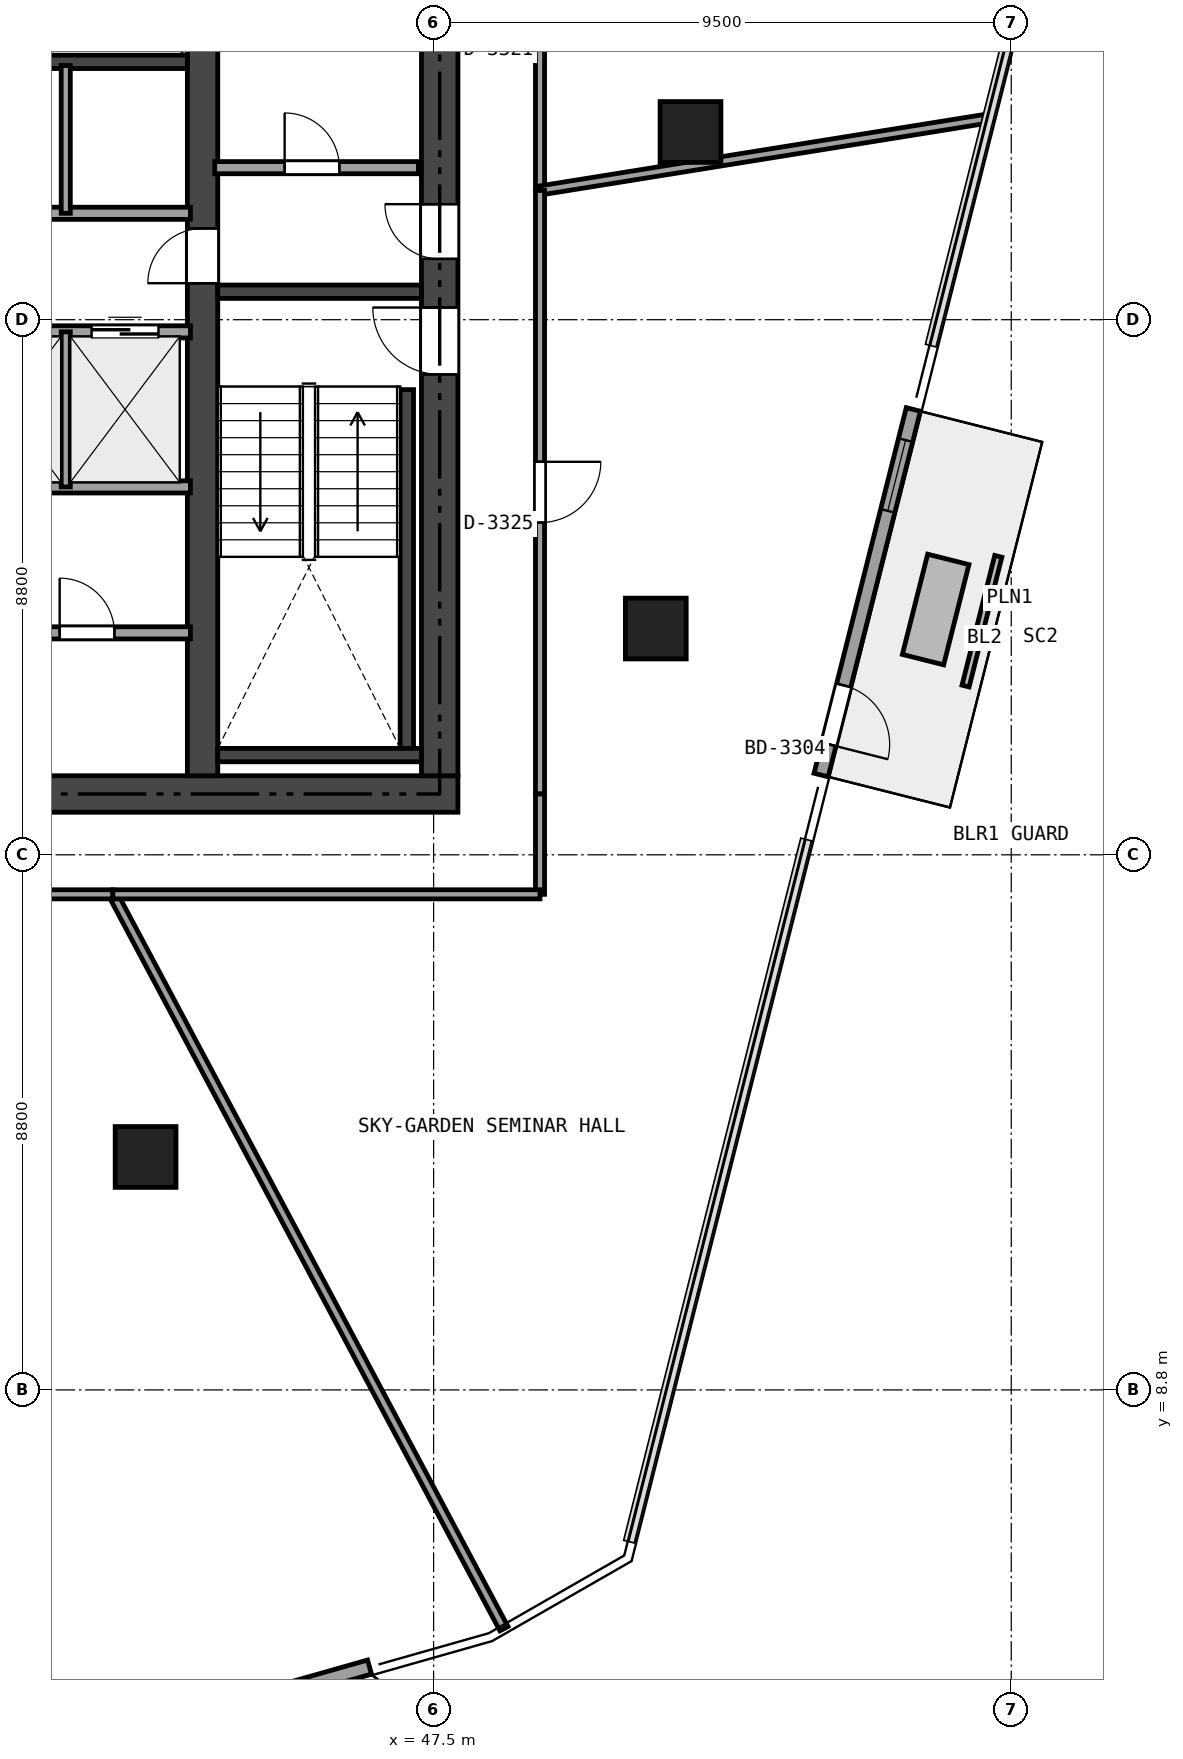
"""IFC4 building model, lengths in metres.
Left out: names, types, materials, properties, quantities, classifications, styles, units other than length and angle.
Written with IfcOpenShell. Run it as: python <this file> out.ifc"""

import sys

from ifc_helpers import new_model, si_unit, direction, frame, frame_2d, origin, origin_2d, place, context, subcontext, project, spatial, rectangle, extrude, element, fill, save


model = new_model("IFC4")
c1 = context("Model", 3, precision=1e-05, world=origin(), true_north=direction((0.0, 1.0)))
c2 = subcontext(c1, "Body", "Model", "MODEL_VIEW")
j1 = project(units=[si_unit("LENGTHUNIT", "METRE"), si_unit("PLANEANGLEUNIT", "RADIAN")], contexts=[c1])
p1 = place(None, origin())
s1 = spatial("IfcSite", under=j1, at=p1, CompositionType="ELEMENT")
p2 = place(p1, origin())
s2 = spatial("IfcBuilding", under=s1, at=p2, CompositionType="ELEMENT")
p3 = place(p2, frame((0.0, 0.0, 125.7)))
s3 = spatial("IfcBuildingStorey", under=s2, at=p3, CompositionType="ELEMENT", Elevation=125.7)
p4 = place(p3, frame((26.5, 18.6, 0.0), z_axis=(0.0, 0.0, 1.0), x_axis=(1.0, 0.0, 0.0)))
e1 = element("IfcWall", 1, at=p4, inside=s3, PredefinedType="SHEAR", context=c2, shape_type="SweptSolid", body=[
    extrude(rectangle(XDim=21.4, YDim=0.6, at=frame_2d((10.7, 0.0))), origin(), (0.0, 0.0, 1.0), 3.32),
])
p5 = place(p4, frame((12.425, 0.0, 0.0)))
e2 = element("IfcOpeningElement", 2, at=p5, cuts=e1, PredefinedType="OPENING", context=c2, shape_type="SweptSolid", body=[
    extrude(rectangle(XDim=1.15, YDim=2.15, at=frame_2d((0.575, 1.075))), frame((0.0, 0.31, 0.0), z_axis=(0.0, -1.0, 0.0), x_axis=(1.0, 0.0, 0.0)), (0.0, 0.0, 1.0), 0.62),
])
p6 = place(p4, frame((5.25, 0.0, 0.0)))
e3 = element("IfcOpeningElement", 3, at=p6, cuts=e1, PredefinedType="OPENING", context=c2, shape_type="SweptSolid", body=[
    extrude(rectangle(XDim=0.9, YDim=2.1, at=frame_2d((0.45, 1.05))), frame((0.0, 0.31, 0.0), z_axis=(0.0, -1.0, 0.0), x_axis=(1.0, 0.0, 0.0)), (0.0, 0.0, 1.0), 0.62),
])
p7 = place(p3, frame((47.6, 18.9, 0.0), z_axis=(0.0, 0.0, 1.0), x_axis=(0.0, 1.0, 0.0)))
e4 = element("IfcWall", 4, at=p7, inside=s3, PredefinedType="SHEAR", context=c2, shape_type="SweptSolid", body=[
    extrude(rectangle(XDim=15.0, YDim=0.6, at=frame_2d((7.5, 0.0))), origin(), (0.0, 0.0, 1.0), 3.32),
])
p8 = place(p7, frame((6.6, 0.0, 0.0)))
e5 = element("IfcOpeningElement", 5, at=p8, cuts=e4, PredefinedType="OPENING", context=c2, shape_type="SweptSolid", body=[
    extrude(rectangle(XDim=1.1, YDim=2.15, at=frame_2d((0.55, 1.075))), frame((0.0, 0.31, 0.0), z_axis=(0.0, -1.0, 0.0), x_axis=(1.0, 0.0, 0.0)), (0.0, 0.0, 1.0), 0.62),
])
p9 = place(p7, frame((8.5, 0.0, 0.0)))
e6 = element("IfcOpeningElement", 6, at=p9, cuts=e4, PredefinedType="OPENING", context=c2, shape_type="SweptSolid", body=[
    extrude(rectangle(XDim=0.9, YDim=2.1, at=frame_2d((0.45, 1.05))), frame((0.0, 0.31, 0.0), z_axis=(0.0, -1.0, 0.0), x_axis=(1.0, 0.0, 0.0)), (0.0, 0.0, 1.0), 0.62),
])
p10 = place(p7, frame((13.15, 0.0, 0.0)))
e7 = element("IfcOpeningElement", 7, at=p10, cuts=e4, PredefinedType="OPENING", context=c2, shape_type="SweptSolid", body=[
    extrude(rectangle(XDim=0.9, YDim=2.1, at=frame_2d((0.45, 1.05))), frame((0.0, 0.31, 0.0), z_axis=(0.0, -1.0, 0.0), x_axis=(1.0, 0.0, 0.0)), (0.0, 0.0, 1.0), 0.62),
])
p11 = place(p3, frame((43.7, 18.9, 0.0), z_axis=(0.0, 0.0, 1.0), x_axis=(0.0, 1.0, 0.0)))
e8 = element("IfcWall", 8, at=p11, inside=s3, PredefinedType="SHEAR", context=c2, shape_type="SweptSolid", body=[
    extrude(rectangle(XDim=15.0, YDim=0.5, at=frame_2d((7.5, 0.0))), origin(), (0.0, 0.0, 1.0), 3.32),
])
p12 = place(p11, frame((8.1, 0.0, 0.0)))
e9 = element("IfcOpeningElement", 9, at=p12, cuts=e8, PredefinedType="OPENING", context=c2, shape_type="SweptSolid", body=[
    extrude(rectangle(XDim=0.9, YDim=2.1, at=frame_2d((0.45, 1.05))), frame((0.0, 0.26, 0.0), z_axis=(0.0, -1.0, 0.0), x_axis=(1.0, 0.0, 0.0)), (0.0, 0.0, 1.0), 0.52),
])
p13 = place(p3, frame((43.95, 26.86, 0.0), z_axis=(0.0, 0.0, 1.0), x_axis=(1.0, 0.0, 0.0)))
e10 = element("IfcWall", 10, at=p13, inside=s3, PredefinedType="SHEAR", context=c2, shape_type="SweptSolid", body=[
    extrude(rectangle(XDim=3.35, YDim=0.22, at=frame_2d((1.675, 0.0))), origin(), (0.0, 0.0, 1.0), 3.32),
])
p14 = place(p3, frame((47.06, 19.35, 0.0), z_axis=(0.0, 0.0, 1.0), x_axis=(0.0, 1.0, 0.0)))
e11 = element("IfcWall", 11, at=p14, inside=s3, PredefinedType="SHEAR", context=c2, shape_type="SweptSolid", body=[
    extrude(rectangle(XDim=5.9, YDim=0.22, at=frame_2d((2.95, 0.0))), origin(), (0.0, 0.0, 1.0), 3.32),
])
p15 = place(p3, frame((43.95, 19.24, 0.0), z_axis=(0.0, 0.0, 1.0), x_axis=(1.0, 0.0, 0.0)))
e12 = element("IfcWall", 12, at=p15, inside=s3, PredefinedType="SHEAR", context=c2, shape_type="SweptSolid", body=[
    extrude(rectangle(XDim=3.35, YDim=0.22, at=frame_2d((1.675, 0.0))), origin(), (0.0, 0.0, 1.0), 3.32),
])
p16 = place(p3, frame((35.84, 30.64, 0.0), z_axis=(0.0, 0.0, 1.0), x_axis=(1.0, 0.0, 0.0)))
e13 = element("IfcWall", 13, at=p16, inside=s3, PredefinedType="SHEAR", context=c2, shape_type="SweptSolid", body=[
    extrude(rectangle(XDim=7.61, YDim=0.22, at=frame_2d((3.805, 0.0))), origin(), (0.0, 0.0, 1.0), 3.32),
])
for number, where, z_axis, x_axis in (
    (14, (51.725, 29.487, -0.405), (0.0, 0.0, 1.0), (1.0, 0.0, 0.0)),
    (15, (42.763, 12.631, -0.405), (0.0, 0.0, 1.0), (1.0, 0.0, 0.0)),
    (16, (51.154, 21.321, -0.405), (0.0, 0.0, 1.0), (1.0, 0.0, 0.0)),
):
    element("IfcColumn", number, at=place(p3, frame(where, z_axis=z_axis, x_axis=x_axis)), inside=s3, PredefinedType="COLUMN", context=c2, shape_type="SweptSolid", body=[
        extrude(rectangle(XDim=1.0, YDim=1.0, at=origin_2d()), origin(), (0.0, 0.0, 1.0), 3.725),
    ])
p17 = place(p3, frame((46.446, 4.242, 0.0), z_axis=(0.0, 0.0, 1.0), x_axis=(-0.962062892843, -0.272827766577, 0.0)))
e17 = element("IfcWall", 17, at=p17, inside=s3, PredefinedType="SOLIDWALL", context=c2, shape_type="SweptSolid", body=[
    extrude(rectangle(XDim=4.6, YDim=0.24, at=frame_2d((2.3, 0.0))), origin(), (0.0, 0.0, 1.0), 3.32),
])
p18 = place(p17, frame((3.08, 0.0, 0.0)))
e18 = element("IfcOpeningElement", 18, at=p18, cuts=e17, PredefinedType="OPENING", context=c2, shape_type="SweptSolid", body=[
    extrude(rectangle(XDim=1.0, YDim=2.15, at=frame_2d((0.5, 1.075))), frame((0.0, 0.13, 0.0), z_axis=(0.0, -1.0, 0.0), x_axis=(1.0, 0.0, 0.0)), (0.0, 0.0, 1.0), 0.26),
])
p19 = place(p3, frame((55.39, 24.924, 0.0), z_axis=(0.0, 0.0, 1.0), x_axis=(-0.244638154376, -0.969614445759, 0.0)))
e19 = element("IfcWall", 19, at=p19, inside=s3, PredefinedType="SOLIDWALL", context=c2, shape_type="SweptSolid", body=[
    extrude(rectangle(XDim=6.2, YDim=0.24, at=frame_2d((3.1, 0.0))), origin(), (0.0, 0.0, 1.0), 3.32),
])
p20 = place(p19, frame((4.68, 0.0, 0.0)))
e20 = element("IfcOpeningElement", 20, at=p20, cuts=e19, PredefinedType="OPENING", context=c2, shape_type="SweptSolid", body=[
    extrude(rectangle(XDim=1.0, YDim=2.15, at=frame_2d((0.5, 1.075))), frame((0.0, 0.13, 0.0), z_axis=(0.0, -1.0, 0.0), x_axis=(1.0, 0.0, 0.0)), (0.0, 0.0, 1.0), 0.26),
])
p21 = place(p19, frame((0.52, 0.0, 0.2)))
e21 = element("IfcOpeningElement", 21, at=p21, cuts=e19, PredefinedType="OPENING", context=c2, shape_type="SweptSolid", body=[
    extrude(rectangle(XDim=1.2, YDim=1.8, at=frame_2d((0.6, 0.9))), frame((0.0, 0.13, 0.0), z_axis=(0.0, -1.0, 0.0), x_axis=(1.0, 0.0, 0.0)), (0.0, 0.0, 1.0), 0.26),
])
p22 = place(p3, frame((43.9, 28.9, 0.0), z_axis=(0.0, 0.0, 1.0), x_axis=(1.0, 0.0, 0.0)))
e22 = element("IfcWall", 22, at=p22, inside=s3, PredefinedType="SOLIDWALL", context=c2, shape_type="SweptSolid", body=[
    extrude(rectangle(XDim=3.35, YDim=0.2, at=frame_2d((1.675, 0.0))), origin(), (0.0, 0.0, 1.0), 3.32),
])
p23 = place(p22, frame((1.15, 0.0, 0.0)))
e23 = element("IfcOpeningElement", 23, at=p23, cuts=e22, PredefinedType="OPENING", context=c2, shape_type="SweptSolid", body=[
    extrude(rectangle(XDim=0.9, YDim=2.1, at=frame_2d((0.45, 1.05))), frame((0.0, 0.11, 0.0), z_axis=(0.0, -1.0, 0.0), x_axis=(1.0, 0.0, 0.0)), (0.0, 0.0, 1.0), 0.22),
])
p24 = place(p3, frame((35.62, 28.15, 0.0), z_axis=(0.0, 0.0, 1.0), x_axis=(1.0, 0.0, 0.0)))
e24 = element("IfcWall", 24, at=p24, inside=s3, PredefinedType="SOLIDWALL", context=c2, shape_type="SweptSolid", body=[
    extrude(rectangle(XDim=7.88, YDim=0.2, at=frame_2d((3.94, 0.0))), origin(), (0.0, 0.0, 1.0), 3.32),
])
p25 = place(p3, frame((35.62, 26.2, 0.0), z_axis=(0.0, 0.0, 1.0), x_axis=(1.0, 0.0, 0.0)))
e25 = element("IfcWall", 25, at=p25, inside=s3, PredefinedType="SOLIDWALL", context=c2, shape_type="SweptSolid", body=[
    extrude(rectangle(XDim=7.88, YDim=0.2, at=frame_2d((3.94, 0.0))), origin(), (0.0, 0.0, 1.0), 3.32),
])
p26 = place(p25, frame((0.405, 0.0, 0.0)))
e26 = element("IfcOpeningElement", 26, at=p26, cuts=e25, PredefinedType="OPENING", context=c2, shape_type="SweptSolid", body=[
    extrude(rectangle(XDim=1.1, YDim=2.15, at=frame_2d((0.55, 1.075))), frame((0.0, 0.11, 0.0), z_axis=(0.0, -1.0, 0.0), x_axis=(1.0, 0.0, 0.0)), (0.0, 0.0, 1.0), 0.22),
])
p27 = place(p25, frame((2.355, 0.0, 0.0)))
e27 = element("IfcOpeningElement", 27, at=p27, cuts=e25, PredefinedType="OPENING", context=c2, shape_type="SweptSolid", body=[
    extrude(rectangle(XDim=1.1, YDim=2.15, at=frame_2d((0.55, 1.075))), frame((0.0, 0.11, 0.0), z_axis=(0.0, -1.0, 0.0), x_axis=(1.0, 0.0, 0.0)), (0.0, 0.0, 1.0), 0.22),
])
p28 = place(p25, frame((4.305, 0.0, 0.0)))
e28 = element("IfcOpeningElement", 28, at=p28, cuts=e25, PredefinedType="OPENING", context=c2, shape_type="SweptSolid", body=[
    extrude(rectangle(XDim=1.1, YDim=2.15, at=frame_2d((0.55, 1.075))), frame((0.0, 0.11, 0.0), z_axis=(0.0, -1.0, 0.0), x_axis=(1.0, 0.0, 0.0)), (0.0, 0.0, 1.0), 0.22),
])
p29 = place(p25, frame((6.255, 0.0, 0.0)))
e29 = element("IfcOpeningElement", 29, at=p29, cuts=e25, PredefinedType="OPENING", context=c2, shape_type="SweptSolid", body=[
    extrude(rectangle(XDim=1.1, YDim=2.15, at=frame_2d((0.55, 1.075))), frame((0.0, 0.11, 0.0), z_axis=(0.0, -1.0, 0.0), x_axis=(1.0, 0.0, 0.0)), (0.0, 0.0, 1.0), 0.22),
])
p30 = place(p3, frame((35.62, 23.65, 0.0), z_axis=(0.0, 0.0, 1.0), x_axis=(1.0, 0.0, 0.0)))
e30 = element("IfcWall", 30, at=p30, inside=s3, PredefinedType="SOLIDWALL", context=c2, shape_type="SweptSolid", body=[
    extrude(rectangle(XDim=7.88, YDim=0.2, at=frame_2d((3.94, 0.0))), origin(), (0.0, 0.0, 1.0), 2.841),
])
p31 = place(p3, frame((35.62, 21.25, 0.0), z_axis=(0.0, 0.0, 1.0), x_axis=(1.0, 0.0, 0.0)))
e31 = element("IfcWall", 31, at=p31, inside=s3, PredefinedType="SOLIDWALL", context=c2, shape_type="SweptSolid", body=[
    extrude(rectangle(XDim=7.88, YDim=0.2, at=frame_2d((3.94, 0.0))), origin(), (0.0, 0.0, 1.0), 3.32),
])
p32 = place(p31, frame((1.13, 0.0, 0.0)))
e32 = element("IfcOpeningElement", 32, at=p32, cuts=e31, PredefinedType="OPENING", context=c2, shape_type="SweptSolid", body=[
    extrude(rectangle(XDim=0.9, YDim=2.1, at=frame_2d((0.45, 1.05))), frame((0.0, 0.11, 0.0), z_axis=(0.0, -1.0, 0.0), x_axis=(1.0, 0.0, 0.0)), (0.0, 0.0, 1.0), 0.22),
])
p33 = place(p31, frame((5.73, 0.0, 0.0)))
e33 = element("IfcOpeningElement", 33, at=p33, cuts=e31, PredefinedType="OPENING", context=c2, shape_type="SweptSolid", body=[
    extrude(rectangle(XDim=0.9, YDim=2.1, at=frame_2d((0.45, 1.05))), frame((0.0, 0.11, 0.0), z_axis=(0.0, -1.0, 0.0), x_axis=(1.0, 0.0, 0.0)), (0.0, 0.0, 1.0), 0.22),
])
p34 = place(p3, frame((41.45, 28.15, 0.0), z_axis=(0.0, 0.0, 1.0), x_axis=(0.0, 1.0, 0.0)))
e34 = element("IfcWall", 34, at=p34, inside=s3, PredefinedType="PARTITIONING", context=c2, shape_type="SweptSolid", body=[
    extrude(rectangle(XDim=2.43, YDim=0.15, at=frame_2d((1.215, 0.0))), origin(), (0.0, 0.0, 1.0), 3.32),
])
p35 = place(p3, frame((41.45, 23.65, 0.0), z_axis=(0.0, 0.0, 1.0), x_axis=(0.0, 1.0, 0.0)))
e35 = element("IfcWall", 35, at=p35, inside=s3, PredefinedType="PARTITIONING", context=c2, shape_type="SweptSolid", body=[
    extrude(rectangle(XDim=2.55, YDim=0.15, at=frame_2d((1.275, 0.0))), origin(), (0.0, 0.0, 1.0), 2.841),
])
p36 = place(p3, frame((49.25, 34.2, 0.0), z_axis=(0.0, 0.0, 1.0), x_axis=(0.0, -1.0, 0.0)))
e36 = element("IfcWall", 36, at=p36, inside=s3, PredefinedType="PARTITIONING", context=c2, shape_type="SweptSolid", body=[
    extrude(rectangle(XDim=5.675, YDim=0.15, at=frame_2d((2.837, 0.0))), origin(), (0.0, 0.0, 1.0), 2.687),
])
p37 = place(p36, frame((2.338, 0.0, 0.0)))
e37 = element("IfcOpeningElement", 37, at=p37, cuts=e36, PredefinedType="OPENING", context=c2, shape_type="SweptSolid", body=[
    extrude(rectangle(XDim=1.0, YDim=2.15, at=frame_2d((0.5, 1.075))), frame((0.0, 0.085, 0.0), z_axis=(0.0, -1.0, 0.0), x_axis=(1.0, 0.0, 0.0)), (0.0, 0.0, 1.0), 0.17),
])
p38 = place(p3, frame((49.25, 28.525, 0.0), z_axis=(0.0, 0.0, 1.0), x_axis=(0.987331098542, 0.158673570109, 0.0)))
e38 = element("IfcWall", 38, at=p38, inside=s3, PredefinedType="PARTITIONING", context=c2, shape_type="SweptSolid", body=[
    extrude(rectangle(XDim=7.513, YDim=0.15, at=frame_2d((3.757, 0.0))), origin(), (0.0, 0.0, 1.0), 2.805),
])
p39 = place(p3, frame((48.657, 4.873, 0.0), z_axis=(0.0, 0.0, 1.0), x_axis=(-0.470068613312, 0.882629876437, 0.0)))
e39 = element("IfcWall", 39, at=p39, inside=s3, PredefinedType="PARTITIONING", context=c2, shape_type="SweptSolid", body=[
    extrude(rectangle(XDim=13.683, YDim=0.15, at=frame_2d((6.841, 0.0))), origin(), (0.0, 0.0, 1.0), 2.805),
])
p40 = place(p3, frame((42.225, 16.95, 0.0), z_axis=(0.0, 0.0, 1.0), x_axis=(-1.0, 0.0, 0.0)))
e40 = element("IfcWall", 40, at=p40, inside=s3, PredefinedType="PARTITIONING", context=c2, shape_type="SweptSolid", body=[
    extrude(rectangle(XDim=14.151, YDim=0.15, at=frame_2d((7.076, 0.0))), origin(), (0.0, 0.0, 1.0), 2.687),
])
p41 = place(p40, frame((6.576, 0.0, 0.0)))
e41 = element("IfcOpeningElement", 41, at=p41, cuts=e40, PredefinedType="OPENING", context=c2, shape_type="SweptSolid", body=[
    extrude(rectangle(XDim=1.0, YDim=2.15, at=frame_2d((0.5, 1.075))), frame((0.0, 0.085, 0.0), z_axis=(0.0, -1.0, 0.0), x_axis=(1.0, 0.0, 0.0)), (0.0, 0.0, 1.0), 0.17),
])
p42 = place(p3, frame((49.25, 28.525, 0.0), z_axis=(0.0, 0.0, 1.0), x_axis=(0.0, -1.0, 0.0)))
e42 = element("IfcWall", 42, at=p42, inside=s3, PredefinedType="PARTITIONING", context=c2, shape_type="SweptSolid", body=[
    extrude(rectangle(XDim=9.925, YDim=0.15, at=frame_2d((4.962, 0.0))), origin(), (0.0, 0.0, 1.0), 2.687),
])
p43 = place(p42, frame((4.462, 0.0, 0.0)))
e43 = element("IfcOpeningElement", 43, at=p43, cuts=e42, PredefinedType="OPENING", context=c2, shape_type="SweptSolid", body=[
    extrude(rectangle(XDim=1.0, YDim=2.15, at=frame_2d((0.5, 1.075))), frame((0.0, 0.085, 0.0), z_axis=(0.0, -1.0, 0.0), x_axis=(1.0, 0.0, 0.0)), (0.0, 0.0, 1.0), 0.17),
])
p44 = place(p3, frame((49.25, 18.6, 0.0), z_axis=(0.0, 0.0, 1.0), x_axis=(0.0, -1.0, 0.0)))
e44 = element("IfcWall", 44, at=p44, inside=s3, PredefinedType="PARTITIONING", context=c2, shape_type="SweptSolid", body=[
    extrude(rectangle(XDim=1.65, YDim=0.15, at=frame_2d((0.825, 0.0))), origin(), (0.0, 0.0, 1.0), 3.32),
])
p45 = place(p3, frame((49.25, 16.95, 0.0), z_axis=(0.0, 0.0, 1.0), x_axis=(-1.0, 0.0, 0.0)))
e45 = element("IfcWall", 45, at=p45, inside=s3, PredefinedType="PARTITIONING", context=c2, shape_type="SweptSolid", body=[
    extrude(rectangle(XDim=7.025, YDim=0.15, at=frame_2d((3.512, 0.0))), origin(), (0.0, 0.0, 1.0), 2.805),
])
p46 = place(p20, origin())
e46 = element("IfcDoor", 46, at=p46, inside=s3, OperationType="SINGLE_SWING_RIGHT", PredefinedType="DOOR", context=c2, shape_type="SweptSolid", body=[
    extrude(rectangle(XDim=1.0, YDim=2.15, at=frame_2d((0.5, 1.075))), frame((0.0, 0.025, 0.0), z_axis=(0.0, -1.0, 0.0), x_axis=(1.0, 0.0, 0.0)), (0.0, 0.0, 1.0), 0.05),
])
fill(e20, e46)
p47 = place(p21, origin())
e47 = element("IfcWindow", 47, at=p47, inside=s3, PartitioningType="SINGLE_PANEL", PredefinedType="WINDOW", context=c2, shape_type="SweptSolid", body=[
    extrude(rectangle(XDim=1.2, YDim=1.8, at=frame_2d((0.6, 0.9))), frame((0.0, 0.03, 0.0), z_axis=(0.0, -1.0, 0.0), x_axis=(1.0, 0.0, 0.0)), (0.0, 0.0, 1.0), 0.06),
])
fill(e21, e47)
p48 = place(p8, origin())
e48 = element("IfcDoor", 48, at=p48, inside=s3, OperationType="SINGLE_SWING_RIGHT", PredefinedType="DOOR", context=c2, shape_type="SweptSolid", body=[
    extrude(rectangle(XDim=1.1, YDim=2.15, at=frame_2d((0.55, 1.075))), frame((0.0, 0.025, 0.0), z_axis=(0.0, -1.0, 0.0), x_axis=(1.0, 0.0, 0.0)), (0.0, 0.0, 1.0), 0.05),
])
fill(e5, e48)
p49 = place(p12, origin())
e49 = element("IfcDoor", 49, at=p49, inside=s3, OperationType="SINGLE_SWING_LEFT", PredefinedType="DOOR", context=c2, shape_type="SweptSolid", body=[
    extrude(rectangle(XDim=0.9, YDim=2.1, at=frame_2d((0.45, 1.05))), frame((0.0, 0.025, 0.0), z_axis=(0.0, -1.0, 0.0), x_axis=(1.0, 0.0, 0.0)), (0.0, 0.0, 1.0), 0.05),
])
fill(e9, e49)
p50 = place(p9, origin())
e50 = element("IfcDoor", 50, at=p50, inside=s3, OperationType="SINGLE_SWING_RIGHT", PredefinedType="DOOR", context=c2, shape_type="SweptSolid", body=[
    extrude(rectangle(XDim=0.9, YDim=2.1, at=frame_2d((0.45, 1.05))), frame((0.0, 0.025, 0.0), z_axis=(0.0, -1.0, 0.0), x_axis=(1.0, 0.0, 0.0)), (0.0, 0.0, 1.0), 0.05),
])
fill(e6, e50)
p51 = place(p23, origin())
e51 = element("IfcDoor", 51, at=p51, inside=s3, OperationType="SINGLE_SWING_LEFT", PredefinedType="DOOR", context=c2, shape_type="SweptSolid", body=[
    extrude(rectangle(XDim=0.9, YDim=2.1, at=frame_2d((0.45, 1.05))), frame((0.0, 0.025, 0.0), z_axis=(0.0, -1.0, 0.0), x_axis=(1.0, 0.0, 0.0)), (0.0, 0.0, 1.0), 0.05),
])
fill(e23, e51)
p52 = place(p33, origin())
e52 = element("IfcDoor", 52, at=p52, inside=s3, OperationType="SINGLE_SWING_LEFT", PredefinedType="DOOR", context=c2, shape_type="SweptSolid", body=[
    extrude(rectangle(XDim=0.9, YDim=2.1, at=frame_2d((0.45, 1.05))), frame((0.0, 0.025, 0.0), z_axis=(0.0, -1.0, 0.0), x_axis=(1.0, 0.0, 0.0)), (0.0, 0.0, 1.0), 0.05),
])
fill(e33, e52)
p53 = place(p29, origin())
e53 = element("IfcDoor", 53, at=p53, inside=s3, OperationType="SLIDING_TO_LEFT", PredefinedType="DOOR", context=c2, shape_type="SweptSolid", body=[
    extrude(rectangle(XDim=1.1, YDim=2.15, at=frame_2d((0.55, 1.075))), frame((0.0, 0.025, 0.0), z_axis=(0.0, -1.0, 0.0), x_axis=(1.0, 0.0, 0.0)), (0.0, 0.0, 1.0), 0.05),
])
fill(e29, e53)
p54 = place(p43, origin())
e54 = element("IfcDoor", 54, at=p54, inside=s3, OperationType="SINGLE_SWING_LEFT", PredefinedType="DOOR", context=c2, shape_type="SweptSolid", body=[
    extrude(rectangle(XDim=1.0, YDim=2.15, at=frame_2d((0.5, 1.075))), frame((0.0, 0.025, 0.0), z_axis=(0.0, -1.0, 0.0), x_axis=(1.0, 0.0, 0.0)), (0.0, 0.0, 1.0), 0.05),
])
fill(e43, e54)
save(model, sys.argv[1])
